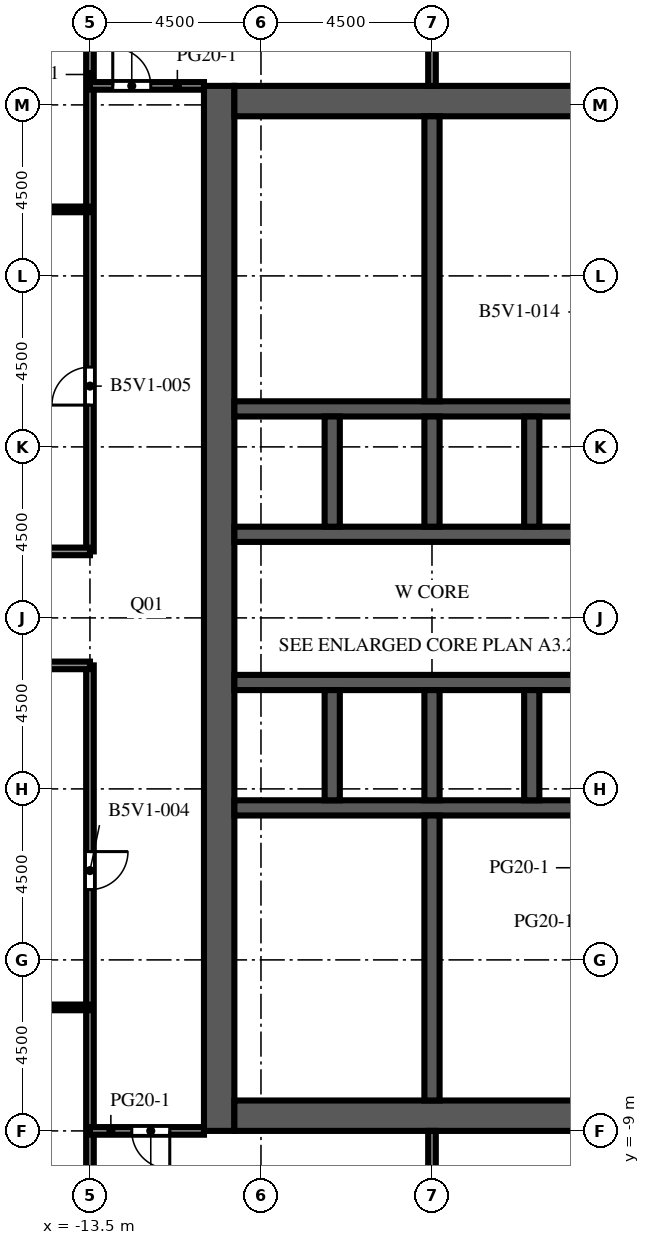
"""IFC4 building model, lengths in metres.
Left out: names, types, materials, properties, quantities, classifications, styles, units other than length and angle.
Written with IfcOpenShell. Run it as: python <this file> out.ifc"""

import sys

from ifc_helpers import new_model, si_unit, direction, frame, frame_2d, origin, place, context, subcontext, project, spatial, rectangle, extrude, element, fill, save


model = new_model("IFC4")
c1 = context("Model", 3, precision=1e-05, world=origin(), true_north=direction((0.0, 1.0)))
c2 = subcontext(c1, "Body", "Model", "MODEL_VIEW")
j1 = project(units=[si_unit("LENGTHUNIT", "METRE"), si_unit("PLANEANGLEUNIT", "RADIAN")], contexts=[c1])
p1 = place(None, origin())
s1 = spatial("IfcSite", under=j1, at=p1, CompositionType="ELEMENT")
p2 = place(p1, origin())
s2 = spatial("IfcBuilding", under=s1, at=p2, CompositionType="ELEMENT")
p3 = place(p2, frame((0.0, 0.0, 165.0)))
s3 = spatial("IfcBuildingStorey", under=s2, at=p3, CompositionType="ELEMENT", Elevation=165.0)
p4 = place(p3, frame((-10.1, -9.0, 0.0), z_axis=(0.0, 0.0, 1.0), x_axis=(0.0, 1.0, 0.0)))
e1 = element("IfcWall", 1, at=p4, inside=s3, PredefinedType="SHEAR", context=c2, shape_type="SweptSolid", body=[
    extrude(rectangle(XDim=27.5, YDim=0.8, at=frame_2d((13.75, 0.0))), origin(), (0.0, 0.0, 1.0), 4.1),
])
p5 = place(p4, frame((12.55, 0.0, 0.0)))
e2 = element("IfcOpeningElement", 2, at=p5, cuts=e1, PredefinedType="OPENING", context=c2, shape_type="SweptSolid", body=[
    extrude(rectangle(XDim=2.4, YDim=2.4, at=frame_2d((1.2, 1.2))), frame((0.0, 0.41, 0.0), z_axis=(0.0, -1.0, 0.0), x_axis=(1.0, 0.0, 0.0)), (0.0, 0.0, 1.0), 0.82),
])
p6 = place(p4, frame((6.825, 0.0, 0.0)))
e3 = element("IfcOpeningElement", 3, at=p6, cuts=e1, PredefinedType="OPENING", context=c2, shape_type="SweptSolid", body=[
    extrude(rectangle(XDim=1.2, YDim=2.1, at=frame_2d((0.6, 1.05))), frame((0.0, 0.41, 0.0), z_axis=(0.0, -1.0, 0.0), x_axis=(1.0, 0.0, 0.0)), (0.0, 0.0, 1.0), 0.82),
])
p7 = place(p4, frame((19.475, 0.0, 0.0)))
e4 = element("IfcOpeningElement", 4, at=p7, cuts=e1, PredefinedType="OPENING", context=c2, shape_type="SweptSolid", body=[
    extrude(rectangle(XDim=1.2, YDim=2.1, at=frame_2d((0.6, 1.05))), frame((0.0, 0.41, 0.0), z_axis=(0.0, -1.0, 0.0), x_axis=(1.0, 0.0, 0.0)), (0.0, 0.0, 1.0), 0.82),
])
for number, where, z_axis, x_axis in (
    (5, (-9.7, -8.6, 0.0), (0.0, 0.0, 1.0), (1.0, 0.0, 0.0)),
    (6, (-9.7, 18.1, 0.0), (0.0, 0.0, 1.0), (1.0, 0.0, 0.0)),
):
    element("IfcWall", number, at=place(p3, frame(where, z_axis=z_axis, x_axis=x_axis)), inside=s3, PredefinedType="SHEAR", context=c2, shape_type="SweptSolid", body=[
        extrude(rectangle(XDim=10.4, YDim=0.8, at=frame_2d((5.2, 0.0))), origin(), (0.0, 0.0, 1.0), 4.1),
    ])
p8 = place(p3, frame((-9.7, -0.5, 0.0), z_axis=(0.0, 0.0, 1.0), x_axis=(1.0, 0.0, 0.0)))
e7 = element("IfcWall", 7, at=p8, inside=s3, PredefinedType="SHEAR", context=c2, shape_type="SweptSolid", body=[
    extrude(rectangle(XDim=10.4, YDim=0.4, at=frame_2d((5.2, 0.0))), origin(), (0.0, 0.0, 1.0), 4.1),
])
p9 = place(p3, frame((-9.7, 2.8, 0.0), z_axis=(0.0, 0.0, 1.0), x_axis=(1.0, 0.0, 0.0)))
e8 = element("IfcWall", 8, at=p9, inside=s3, PredefinedType="SHEAR", context=c2, shape_type="SweptSolid", body=[
    extrude(rectangle(XDim=10.4, YDim=0.4, at=frame_2d((5.2, 0.0))), origin(), (0.0, 0.0, 1.0), 4.1),
])
p10 = place(p9, frame((0.738, 0.0, 0.0)))
e9 = element("IfcOpeningElement", 9, at=p10, cuts=e8, PredefinedType="OPENING", context=c2, shape_type="SweptSolid", body=[
    extrude(rectangle(XDim=1.1, YDim=2.1, at=frame_2d((0.55, 1.05))), frame((0.0, 0.21, 0.0), z_axis=(0.0, -1.0, 0.0), x_axis=(1.0, 0.0, 0.0)), (0.0, 0.0, 1.0), 0.42),
])
p11 = place(p9, frame((3.337, 0.0, 0.0)))
e10 = element("IfcOpeningElement", 10, at=p11, cuts=e8, PredefinedType="OPENING", context=c2, shape_type="SweptSolid", body=[
    extrude(rectangle(XDim=1.1, YDim=2.1, at=frame_2d((0.55, 1.05))), frame((0.0, 0.21, 0.0), z_axis=(0.0, -1.0, 0.0), x_axis=(1.0, 0.0, 0.0)), (0.0, 0.0, 1.0), 0.42),
])
p12 = place(p9, frame((6.012, 0.0, 0.0)))
e11 = element("IfcOpeningElement", 11, at=p12, cuts=e8, PredefinedType="OPENING", context=c2, shape_type="SweptSolid", body=[
    extrude(rectangle(XDim=1.0, YDim=2.1, at=frame_2d((0.5, 1.05))), frame((0.0, 0.21, 0.0), z_axis=(0.0, -1.0, 0.0), x_axis=(1.0, 0.0, 0.0)), (0.0, 0.0, 1.0), 0.42),
])
p13 = place(p9, frame((8.613, 0.0, 0.0)))
e12 = element("IfcOpeningElement", 12, at=p13, cuts=e8, PredefinedType="OPENING", context=c2, shape_type="SweptSolid", body=[
    extrude(rectangle(XDim=1.0, YDim=2.1, at=frame_2d((0.5, 1.05))), frame((0.0, 0.21, 0.0), z_axis=(0.0, -1.0, 0.0), x_axis=(1.0, 0.0, 0.0)), (0.0, 0.0, 1.0), 0.42),
])
p14 = place(p3, frame((-9.7, 6.7, 0.0), z_axis=(0.0, 0.0, 1.0), x_axis=(1.0, 0.0, 0.0)))
e13 = element("IfcWall", 13, at=p14, inside=s3, PredefinedType="SHEAR", context=c2, shape_type="SweptSolid", body=[
    extrude(rectangle(XDim=10.4, YDim=0.4, at=frame_2d((5.2, 0.0))), origin(), (0.0, 0.0, 1.0), 4.1),
])
p15 = place(p14, frame((3.337, 0.0, 0.0)))
e14 = element("IfcOpeningElement", 14, at=p15, cuts=e13, PredefinedType="OPENING", context=c2, shape_type="SweptSolid", body=[
    extrude(rectangle(XDim=1.1, YDim=2.1, at=frame_2d((0.55, 1.05))), frame((0.0, 0.21, 0.0), z_axis=(0.0, -1.0, 0.0), x_axis=(1.0, 0.0, 0.0)), (0.0, 0.0, 1.0), 0.42),
])
p16 = place(p14, frame((5.962, 0.0, 0.0)))
e15 = element("IfcOpeningElement", 15, at=p16, cuts=e13, PredefinedType="OPENING", context=c2, shape_type="SweptSolid", body=[
    extrude(rectangle(XDim=1.1, YDim=2.1, at=frame_2d((0.55, 1.05))), frame((0.0, 0.21, 0.0), z_axis=(0.0, -1.0, 0.0), x_axis=(1.0, 0.0, 0.0)), (0.0, 0.0, 1.0), 0.42),
])
p17 = place(p14, frame((8.663, 0.0, 0.0)))
e16 = element("IfcOpeningElement", 16, at=p17, cuts=e13, PredefinedType="OPENING", context=c2, shape_type="SweptSolid", body=[
    extrude(rectangle(XDim=1.1, YDim=2.1, at=frame_2d((0.55, 1.05))), frame((0.0, 0.21, 0.0), z_axis=(0.0, -1.0, 0.0), x_axis=(1.0, 0.0, 0.0)), (0.0, 0.0, 1.0), 0.42),
])
p18 = place(p14, frame((0.688, 0.0, 0.0)))
e17 = element("IfcOpeningElement", 17, at=p18, cuts=e13, PredefinedType="OPENING", context=c2, shape_type="SweptSolid", body=[
    extrude(rectangle(XDim=1.0, YDim=2.1, at=frame_2d((0.5, 1.05))), frame((0.0, 0.21, 0.0), z_axis=(0.0, -1.0, 0.0), x_axis=(1.0, 0.0, 0.0)), (0.0, 0.0, 1.0), 0.42),
])
p19 = place(p3, frame((-9.7, 10.0, 0.0), z_axis=(0.0, 0.0, 1.0), x_axis=(1.0, 0.0, 0.0)))
e18 = element("IfcWall", 18, at=p19, inside=s3, PredefinedType="SHEAR", context=c2, shape_type="SweptSolid", body=[
    extrude(rectangle(XDim=10.4, YDim=0.4, at=frame_2d((5.2, 0.0))), origin(), (0.0, 0.0, 1.0), 4.1),
])
for number, where, z_axis, x_axis in (
    (19, (-7.125, -0.3, 0.0), (0.0, 0.0, 1.0), (0.0, 1.0, 0.0)),
    (20, (-7.125, 6.9, 0.0), (0.0, 0.0, 1.0), (0.0, 1.0, 0.0)),
    (21, (-4.5, -0.3, 0.0), (0.0, 0.0, 1.0), (0.0, 1.0, 0.0)),
    (22, (-4.5, 6.9, 0.0), (0.0, 0.0, 1.0), (0.0, 1.0, 0.0)),
    (23, (-1.875, -0.3, 0.0), (0.0, 0.0, 1.0), (0.0, 1.0, 0.0)),
    (24, (-1.875, 6.9, 0.0), (0.0, 0.0, 1.0), (0.0, 1.0, 0.0)),
):
    element("IfcWall", number, at=place(p3, frame(where, z_axis=z_axis, x_axis=x_axis)), inside=s3, PredefinedType="SHEAR", context=c2, shape_type="SweptSolid", body=[
        extrude(rectangle(XDim=2.9, YDim=0.4, at=frame_2d((1.45, 0.0))), origin(), (0.0, 0.0, 1.0), 4.1),
    ])
for number, where, z_axis, x_axis in (
    (25, (-4.5, -8.2, 0.0), (0.0, 0.0, 1.0), (0.0, 1.0, 0.0)),
    (26, (-4.5, 10.2, 0.0), (0.0, 0.0, 1.0), (0.0, 1.0, 0.0)),
):
    element("IfcWall", number, at=place(p3, frame(where, z_axis=z_axis, x_axis=x_axis)), inside=s3, PredefinedType="SHEAR", context=c2, shape_type="SweptSolid", body=[
        extrude(rectangle(XDim=7.5, YDim=0.4, at=frame_2d((3.75, 0.0))), origin(), (0.0, 0.0, 1.0), 4.1),
    ])
for number, where, z_axis, x_axis in (
    (27, (-4.3, -5.65, 0.0), (0.0, 0.0, 1.0), (1.0, 0.0, 0.0)),
    (28, (-4.3, -3.55, 0.0), (0.0, 0.0, 1.0), (1.0, 0.0, 0.0)),
):
    element("IfcWall", number, at=place(p3, frame(where, z_axis=z_axis, x_axis=x_axis)), inside=s3, PredefinedType="PARTITIONING", context=c2, shape_type="SweptSolid", body=[
        extrude(rectangle(XDim=3.5, YDim=0.1, at=frame_2d((1.75, 0.0))), origin(), (0.0, 0.0, 1.0), 3.65),
    ])
for number, where, z_axis, x_axis in (
    (29, (-4.3, 12.45, 0.0), (0.0, 0.0, 1.0), (1.0, 0.0, 0.0)),
    (30, (-4.3, 14.85, 0.0), (0.0, 0.0, 1.0), (1.0, 0.0, 0.0)),
):
    element("IfcWall", number, at=place(p3, frame(where, z_axis=z_axis, x_axis=x_axis)), inside=s3, PredefinedType="PARTITIONING", context=c2, shape_type="SweptSolid", body=[
        extrude(rectangle(XDim=3.6, YDim=0.1, at=frame_2d((1.8, 0.0))), origin(), (0.0, 0.0, 1.0), 3.65),
    ])
p20 = place(p3, frame((-13.5, -26.5, 0.0), z_axis=(0.0, 0.0, 1.0), x_axis=(0.0, 1.0, 0.0)))
e31 = element("IfcWall", 31, at=p20, inside=s3, PredefinedType="PARTITIONING", context=c2, shape_type="SweptSolid", body=[
    extrude(rectangle(XDim=29.75, YDim=0.2, at=frame_2d((14.875, 0.0))), origin(), (0.0, 0.0, 1.0), 3.65),
])
p21 = place(p20, frame((23.85, 0.0, 0.0)))
e32 = element("IfcOpeningElement", 32, at=p21, cuts=e31, PredefinedType="OPENING", context=c2, shape_type="SweptSolid", body=[
    extrude(rectangle(XDim=1.0, YDim=2.1, at=frame_2d((0.5, 1.05))), frame((0.0, 0.11, 0.0), z_axis=(0.0, -1.0, 0.0), x_axis=(1.0, 0.0, 0.0)), (0.0, 0.0, 1.0), 0.22),
])
p22 = place(p3, frame((-13.5, 6.25, 0.0), z_axis=(0.0, 0.0, 1.0), x_axis=(0.0, 1.0, 0.0)))
e33 = element("IfcWall", 33, at=p22, inside=s3, PredefinedType="PARTITIONING", context=c2, shape_type="SweptSolid", body=[
    extrude(rectangle(XDim=20.25, YDim=0.2, at=frame_2d((10.125, 0.0))), origin(), (0.0, 0.0, 1.0), 3.65),
])
p23 = place(p22, frame((3.85, 0.0, 0.0)))
e34 = element("IfcOpeningElement", 34, at=p23, cuts=e33, PredefinedType="OPENING", context=c2, shape_type="SweptSolid", body=[
    extrude(rectangle(XDim=1.0, YDim=2.1, at=frame_2d((0.5, 1.05))), frame((0.0, 0.11, 0.0), z_axis=(0.0, -1.0, 0.0), x_axis=(1.0, 0.0, 0.0)), (0.0, 0.0, 1.0), 0.22),
])
p24 = place(p3, frame((-4.5, -26.5, 0.0), z_axis=(0.0, 0.0, 1.0), x_axis=(0.0, 1.0, 0.0)))
e35 = element("IfcWall", 35, at=p24, inside=s3, PredefinedType="PARTITIONING", context=c2, shape_type="SweptSolid", body=[
    extrude(rectangle(XDim=17.5, YDim=0.2, at=frame_2d((8.75, 0.0))), origin(), (0.0, 0.0, 1.0), 3.65),
])
p25 = place(p3, frame((-4.5, 18.5, 0.0), z_axis=(0.0, 0.0, 1.0), x_axis=(0.0, 1.0, 0.0)))
e36 = element("IfcWall", 36, at=p25, inside=s3, PredefinedType="PARTITIONING", context=c2, shape_type="SweptSolid", body=[
    extrude(rectangle(XDim=8.0, YDim=0.2, at=frame_2d((4.0, 0.0))), origin(), (0.0, 0.0, 1.0), 3.65),
])
p26 = place(p3, frame((-10.5, -9.0, 0.0), z_axis=(0.0, 0.0, 1.0), x_axis=(-1.0, 0.0, 0.0)))
e37 = element("IfcWall", 37, at=p26, inside=s3, PredefinedType="PARTITIONING", context=c2, shape_type="SweptSolid", body=[
    extrude(rectangle(XDim=3.0, YDim=0.2, at=frame_2d((1.5, 0.0))), origin(), (0.0, 0.0, 1.0), 3.65),
])
p27 = place(p26, frame((0.9, 0.0, 0.0)))
e38 = element("IfcOpeningElement", 38, at=p27, cuts=e37, PredefinedType="OPENING", context=c2, shape_type="SweptSolid", body=[
    extrude(rectangle(XDim=1.0, YDim=2.1, at=frame_2d((0.5, 1.05))), frame((0.0, 0.11, 0.0), z_axis=(0.0, -1.0, 0.0), x_axis=(1.0, 0.0, 0.0)), (0.0, 0.0, 1.0), 0.22),
])
p28 = place(p3, frame((-13.5, -5.75, 0.0), z_axis=(0.0, 0.0, 1.0), x_axis=(-1.0, 0.0, 0.0)))
e39 = element("IfcWall", 39, at=p28, inside=s3, PredefinedType="PARTITIONING", context=c2, shape_type="SweptSolid", body=[
    extrude(rectangle(XDim=13.35, YDim=0.15, at=frame_2d((6.675, 0.0))), origin(), (0.0, 0.0, 1.0), 3.65),
])
p29 = place(p28, frame((8.9, 0.0, 0.0)))
e40 = element("IfcOpeningElement", 40, at=p29, cuts=e39, PredefinedType="OPENING", context=c2, shape_type="SweptSolid", body=[
    extrude(rectangle(XDim=1.0, YDim=2.1, at=frame_2d((0.5, 1.05))), frame((0.0, 0.085, 0.0), z_axis=(0.0, -1.0, 0.0), x_axis=(1.0, 0.0, 0.0)), (0.0, 0.0, 1.0), 0.17),
])
p30 = place(p28, frame((1.65, 0.0, 0.0)))
e41 = element("IfcOpeningElement", 41, at=p30, cuts=e39, PredefinedType="OPENING", context=c2, shape_type="SweptSolid", body=[
    extrude(rectangle(XDim=1.0, YDim=2.1, at=frame_2d((0.5, 1.05))), frame((0.0, 0.085, 0.0), z_axis=(0.0, -1.0, 0.0), x_axis=(1.0, 0.0, 0.0)), (0.0, 0.0, 1.0), 0.17),
])
p31 = place(p3, frame((-13.5, 3.25, 0.0), z_axis=(0.0, 0.0, 1.0), x_axis=(-1.0, 0.0, 0.0)))
e42 = element("IfcWall", 42, at=p31, inside=s3, PredefinedType="PARTITIONING", context=c2, shape_type="SweptSolid", body=[
    extrude(rectangle(XDim=13.35, YDim=0.2, at=frame_2d((6.675, 0.0))), origin(), (0.0, 0.0, 1.0), 3.65),
])
p32 = place(p31, frame((8.15, 0.0, 0.0)))
e43 = element("IfcOpeningElement", 43, at=p32, cuts=e42, PredefinedType="OPENING", context=c2, shape_type="SweptSolid", body=[
    extrude(rectangle(XDim=1.0, YDim=2.1, at=frame_2d((0.5, 1.05))), frame((0.0, 0.11, 0.0), z_axis=(0.0, -1.0, 0.0), x_axis=(1.0, 0.0, 0.0)), (0.0, 0.0, 1.0), 0.22),
])
p33 = place(p3, frame((-26.85, 6.25, 0.0), z_axis=(0.0, 0.0, 1.0), x_axis=(1.0, 0.0, 0.0)))
e44 = element("IfcWall", 44, at=p33, inside=s3, PredefinedType="PARTITIONING", context=c2, shape_type="SweptSolid", body=[
    extrude(rectangle(XDim=13.35, YDim=0.2, at=frame_2d((6.675, 0.0))), origin(), (0.0, 0.0, 1.0), 3.65),
])
p34 = place(p33, frame((2.45, 0.0, 0.0)))
e45 = element("IfcOpeningElement", 45, at=p34, cuts=e44, PredefinedType="OPENING", context=c2, shape_type="SweptSolid", body=[
    extrude(rectangle(XDim=1.0, YDim=2.1, at=frame_2d((0.5, 1.05))), frame((0.0, 0.11, 0.0), z_axis=(0.0, -1.0, 0.0), x_axis=(1.0, 0.0, 0.0)), (0.0, 0.0, 1.0), 0.22),
])
p35 = place(p3, frame((-26.85, 15.25, 0.0), z_axis=(0.0, 0.0, 1.0), x_axis=(1.0, 0.0, 0.0)))
e46 = element("IfcWall", 46, at=p35, inside=s3, PredefinedType="PARTITIONING", context=c2, shape_type="SweptSolid", body=[
    extrude(rectangle(XDim=13.35, YDim=0.15, at=frame_2d((6.675, 0.0))), origin(), (0.0, 0.0, 1.0), 3.65),
])
p36 = place(p35, frame((2.95, 0.0, 0.0)))
e47 = element("IfcOpeningElement", 47, at=p36, cuts=e46, PredefinedType="OPENING", context=c2, shape_type="SweptSolid", body=[
    extrude(rectangle(XDim=1.0, YDim=2.1, at=frame_2d((0.5, 1.05))), frame((0.0, 0.085, 0.0), z_axis=(0.0, -1.0, 0.0), x_axis=(1.0, 0.0, 0.0)), (0.0, 0.0, 1.0), 0.17),
])
p37 = place(p35, frame((10.2, 0.0, 0.0)))
e48 = element("IfcOpeningElement", 48, at=p37, cuts=e46, PredefinedType="OPENING", context=c2, shape_type="SweptSolid", body=[
    extrude(rectangle(XDim=1.0, YDim=2.1, at=frame_2d((0.5, 1.05))), frame((0.0, 0.085, 0.0), z_axis=(0.0, -1.0, 0.0), x_axis=(1.0, 0.0, 0.0)), (0.0, 0.0, 1.0), 0.17),
])
p38 = place(p3, frame((-13.5, 18.5, 0.0), z_axis=(0.0, 0.0, 1.0), x_axis=(1.0, 0.0, 0.0)))
e49 = element("IfcWall", 49, at=p38, inside=s3, PredefinedType="PARTITIONING", context=c2, shape_type="SweptSolid", body=[
    extrude(rectangle(XDim=3.0, YDim=0.2, at=frame_2d((1.5, 0.0))), origin(), (0.0, 0.0, 1.0), 3.65),
])
p39 = place(p38, frame((0.6, 0.0, 0.0)))
e50 = element("IfcOpeningElement", 50, at=p39, cuts=e49, PredefinedType="OPENING", context=c2, shape_type="SweptSolid", body=[
    extrude(rectangle(XDim=1.0, YDim=2.1, at=frame_2d((0.5, 1.05))), frame((0.0, 0.11, 0.0), z_axis=(0.0, -1.0, 0.0), x_axis=(1.0, 0.0, 0.0)), (0.0, 0.0, 1.0), 0.22),
])
p40 = place(p10, origin())
e51 = element("IfcDoor", 51, at=p40, inside=s3, OperationType="DOUBLE_DOOR_SLIDING", PredefinedType="DOOR", context=c2, shape_type="SweptSolid", body=[
    extrude(rectangle(XDim=1.1, YDim=2.1, at=frame_2d((0.55, 1.05))), frame((0.0, 0.025, 0.0), z_axis=(0.0, -1.0, 0.0), x_axis=(1.0, 0.0, 0.0)), (0.0, 0.0, 1.0), 0.05),
])
fill(e9, e51)
p41 = place(p11, origin())
e52 = element("IfcDoor", 52, at=p41, inside=s3, OperationType="DOUBLE_DOOR_SLIDING", PredefinedType="DOOR", context=c2, shape_type="SweptSolid", body=[
    extrude(rectangle(XDim=1.1, YDim=2.1, at=frame_2d((0.55, 1.05))), frame((0.0, 0.025, 0.0), z_axis=(0.0, -1.0, 0.0), x_axis=(1.0, 0.0, 0.0)), (0.0, 0.0, 1.0), 0.05),
])
fill(e10, e52)
p42 = place(p15, origin())
e53 = element("IfcDoor", 53, at=p42, inside=s3, OperationType="DOUBLE_DOOR_SLIDING", PredefinedType="DOOR", context=c2, shape_type="SweptSolid", body=[
    extrude(rectangle(XDim=1.1, YDim=2.1, at=frame_2d((0.55, 1.05))), frame((0.0, 0.025, 0.0), z_axis=(0.0, -1.0, 0.0), x_axis=(1.0, 0.0, 0.0)), (0.0, 0.0, 1.0), 0.05),
])
fill(e14, e53)
p43 = place(p16, origin())
e54 = element("IfcDoor", 54, at=p43, inside=s3, OperationType="DOUBLE_DOOR_SLIDING", PredefinedType="DOOR", context=c2, shape_type="SweptSolid", body=[
    extrude(rectangle(XDim=1.1, YDim=2.1, at=frame_2d((0.55, 1.05))), frame((0.0, 0.025, 0.0), z_axis=(0.0, -1.0, 0.0), x_axis=(1.0, 0.0, 0.0)), (0.0, 0.0, 1.0), 0.05),
])
fill(e15, e54)
p44 = place(p17, origin())
e55 = element("IfcDoor", 55, at=p44, inside=s3, OperationType="DOUBLE_DOOR_SLIDING", PredefinedType="DOOR", context=c2, shape_type="SweptSolid", body=[
    extrude(rectangle(XDim=1.1, YDim=2.1, at=frame_2d((0.55, 1.05))), frame((0.0, 0.025, 0.0), z_axis=(0.0, -1.0, 0.0), x_axis=(1.0, 0.0, 0.0)), (0.0, 0.0, 1.0), 0.05),
])
fill(e16, e55)
p45 = place(p5, origin())
e56 = element("IfcDoor", 56, at=p45, inside=s3, OperationType="DOUBLE_DOOR_DOUBLE_SWING", PredefinedType="DOOR", context=c2, shape_type="SweptSolid", body=[
    extrude(rectangle(XDim=2.4, YDim=2.4, at=frame_2d((1.2, 1.2))), frame((0.0, 0.025, 0.0), z_axis=(0.0, -1.0, 0.0), x_axis=(1.0, 0.0, 0.0)), (0.0, 0.0, 1.0), 0.05),
])
fill(e2, e56)
p46 = place(p6, origin())
e57 = element("IfcDoor", 57, at=p46, inside=s3, OperationType="SINGLE_SWING_LEFT", PredefinedType="DOOR", context=c2, shape_type="SweptSolid", body=[
    extrude(rectangle(XDim=1.2, YDim=2.1, at=frame_2d((0.6, 1.05))), frame((0.0, 0.025, 0.0), z_axis=(0.0, -1.0, 0.0), x_axis=(1.0, 0.0, 0.0)), (0.0, 0.0, 1.0), 0.05),
])
fill(e3, e57)
p47 = place(p7, origin())
e58 = element("IfcDoor", 58, at=p47, inside=s3, OperationType="SINGLE_SWING_LEFT", PredefinedType="DOOR", context=c2, shape_type="SweptSolid", body=[
    extrude(rectangle(XDim=1.2, YDim=2.1, at=frame_2d((0.6, 1.05))), frame((0.0, 0.025, 0.0), z_axis=(0.0, -1.0, 0.0), x_axis=(1.0, 0.0, 0.0)), (0.0, 0.0, 1.0), 0.05),
])
fill(e4, e58)
p48 = place(p12, origin())
e59 = element("IfcDoor", 59, at=p48, inside=s3, OperationType="SINGLE_SWING_LEFT", PredefinedType="DOOR", context=c2, shape_type="SweptSolid", body=[
    extrude(rectangle(XDim=1.0, YDim=2.1, at=frame_2d((0.5, 1.05))), frame((0.0, 0.025, 0.0), z_axis=(0.0, -1.0, 0.0), x_axis=(1.0, 0.0, 0.0)), (0.0, 0.0, 1.0), 0.05),
])
fill(e11, e59)
p49 = place(p13, origin())
e60 = element("IfcDoor", 60, at=p49, inside=s3, OperationType="SINGLE_SWING_RIGHT", PredefinedType="DOOR", context=c2, shape_type="SweptSolid", body=[
    extrude(rectangle(XDim=1.0, YDim=2.1, at=frame_2d((0.5, 1.05))), frame((0.0, 0.025, 0.0), z_axis=(0.0, -1.0, 0.0), x_axis=(1.0, 0.0, 0.0)), (0.0, 0.0, 1.0), 0.05),
])
fill(e12, e60)
p50 = place(p18, origin())
e61 = element("IfcDoor", 61, at=p50, inside=s3, OperationType="SINGLE_SWING_LEFT", PredefinedType="DOOR", context=c2, shape_type="SweptSolid", body=[
    extrude(rectangle(XDim=1.0, YDim=2.1, at=frame_2d((0.5, 1.05))), frame((0.0, 0.025, 0.0), z_axis=(0.0, -1.0, 0.0), x_axis=(1.0, 0.0, 0.0)), (0.0, 0.0, 1.0), 0.05),
])
fill(e17, e61)
p51 = place(p21, origin())
e62 = element("IfcDoor", 62, at=p51, inside=s3, OperationType="SINGLE_SWING_RIGHT", PredefinedType="DOOR", context=c2, shape_type="SweptSolid", body=[
    extrude(rectangle(XDim=1.0, YDim=2.1, at=frame_2d((0.5, 1.05))), frame((0.0, 0.025, 0.0), z_axis=(0.0, -1.0, 0.0), x_axis=(1.0, 0.0, 0.0)), (0.0, 0.0, 1.0), 0.05),
])
fill(e32, e62)
p52 = place(p23, origin())
e63 = element("IfcDoor", 63, at=p52, inside=s3, OperationType="SINGLE_SWING_LEFT", PredefinedType="DOOR", context=c2, shape_type="SweptSolid", body=[
    extrude(rectangle(XDim=1.0, YDim=2.1, at=frame_2d((0.5, 1.05))), frame((0.0, 0.025, 0.0), z_axis=(0.0, -1.0, 0.0), x_axis=(1.0, 0.0, 0.0)), (0.0, 0.0, 1.0), 0.05),
])
fill(e34, e63)
p53 = place(p27, origin())
e64 = element("IfcDoor", 64, at=p53, inside=s3, OperationType="SINGLE_SWING_LEFT", PredefinedType="DOOR", context=c2, shape_type="SweptSolid", body=[
    extrude(rectangle(XDim=1.0, YDim=2.1, at=frame_2d((0.5, 1.05))), frame((0.0, 0.025, 0.0), z_axis=(0.0, -1.0, 0.0), x_axis=(1.0, 0.0, 0.0)), (0.0, 0.0, 1.0), 0.05),
])
fill(e38, e64)
p54 = place(p39, origin())
e65 = element("IfcDoor", 65, at=p54, inside=s3, OperationType="SINGLE_SWING_LEFT", PredefinedType="DOOR", context=c2, shape_type="SweptSolid", body=[
    extrude(rectangle(XDim=1.0, YDim=2.1, at=frame_2d((0.5, 1.05))), frame((0.0, 0.025, 0.0), z_axis=(0.0, -1.0, 0.0), x_axis=(1.0, 0.0, 0.0)), (0.0, 0.0, 1.0), 0.05),
])
fill(e50, e65)
save(model, sys.argv[1])
